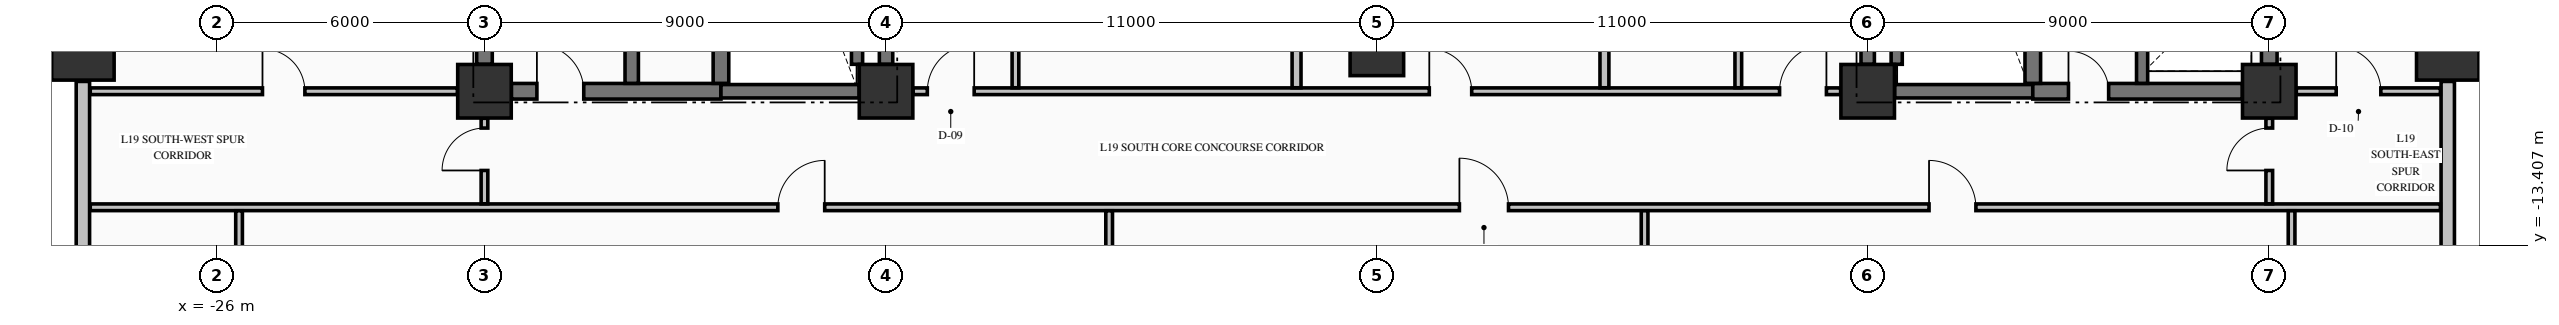
"""IFC4 building model, lengths in metres.
Left out: names, types, materials, properties, quantities, classifications, styles, units other than length and angle.
Written with IfcOpenShell. Run it as: python <this file> out.ifc"""

import sys

from ifc_helpers import new_model, si_unit, direction, frame, frame_2d, origin, origin_2d, place, context, subcontext, project, spatial, rectangle, extrude, element, fill, save


model = new_model("IFC4")
c1 = context("Model", 3, precision=1e-05, world=origin(), true_north=direction((0.0, 1.0)))
c2 = subcontext(c1, "Body", "Model", "MODEL_VIEW")
j1 = project(units=[si_unit("LENGTHUNIT", "METRE"), si_unit("PLANEANGLEUNIT", "RADIAN")], contexts=[c1])
p1 = place(None, origin())
s1 = spatial("IfcSite", under=j1, at=p1, CompositionType="ELEMENT")
p2 = place(p1, origin())
s2 = spatial("IfcBuilding", under=s1, at=p2, CompositionType="ELEMENT")
p3 = place(p2, frame((0.0, 0.0, 78.61)))
s3 = spatial("IfcBuildingStorey", under=s2, at=p3, CompositionType="ELEMENT", Elevation=78.61)
for number, where, z_axis, x_axis in (
    (1, (-29.0, -9.0, -0.25), (0.0, 0.0, 1.0), (1.0, 0.0, 0.0)),
    (2, (24.0, -9.0, -0.25), (0.0, 0.0, 1.0), (1.0, 0.0, 0.0)),
):
    element("IfcColumn", number, at=place(p3, frame(where, z_axis=z_axis, x_axis=x_axis)), inside=s3, PredefinedType="COLUMN", context=c2, shape_type="SweptSolid", body=[
        extrude(rectangle(XDim=1.4, YDim=1.4, at=origin_2d()), origin(), (0.0, 0.0, 1.0), 3.395),
    ])
for number, where, z_axis, x_axis in (
    (3, (-20.0, -9.95, -0.25), (0.0, 0.0, 1.0), (1.0, 0.0, 0.0)),
    (4, (-11.0, -9.95, -0.25), (0.0, 0.0, 1.0), (1.0, 0.0, 0.0)),
    (5, (11.0, -9.95, -0.25), (0.0, 0.0, 1.0), (1.0, 0.0, 0.0)),
    (6, (20.0, -9.95, -0.25), (0.0, 0.0, 1.0), (1.0, 0.0, 0.0)),
    (7, (0.0, -9.0, -0.25), (0.0, 0.0, 1.0), (1.0, 0.0, 0.0)),
):
    element("IfcColumn", number, at=place(p3, frame(where, z_axis=z_axis, x_axis=x_axis)), inside=s3, PredefinedType="COLUMN", context=c2, shape_type="SweptSolid", body=[
        extrude(rectangle(XDim=1.2, YDim=1.2, at=origin_2d()), origin(), (0.0, 0.0, 1.0), 3.395),
    ])
for number, where, z_axis, x_axis in (
    (8, (24.0, -22.27, 0.0), (0.0, 0.0, 1.0), (0.0, 1.0, 0.0)),
    (9, (-29.0, -9.73, 0.0), (0.0, 0.0, 1.0), (0.0, -1.0, 0.0)),
):
    element("IfcWall", number, at=place(p3, frame(where, z_axis=z_axis, x_axis=x_axis)), inside=s3, PredefinedType="STANDARD", context=c2, shape_type="SweptSolid", body=[
        extrude(rectangle(XDim=12.54, YDim=0.3, at=frame_2d((6.27, 0.0))), origin(), (0.0, 0.0, 1.0), 2.537),
    ])
p4 = place(p3, frame((-19.396, -9.95, 0.0), z_axis=(0.0, 0.0, 1.0), x_axis=(1.0, 0.0, 0.0)))
e10 = element("IfcWall", 10, at=p4, inside=s3, PredefinedType="SHEAR", context=c2, shape_type="SweptSolid", body=[
    extrude(rectangle(XDim=4.696, YDim=0.35, at=frame_2d((2.348, 0.0))), origin(), (0.0, 0.0, 1.0), 3.145),
])
p5 = place(p4, frame((0.571, 0.0, 0.0)))
e11 = element("IfcOpeningElement", 11, at=p5, cuts=e10, PredefinedType="OPENING", context=c2, shape_type="SweptSolid", body=[
    extrude(rectangle(XDim=1.05, YDim=2.15, at=frame_2d((0.525, 1.075))), frame((0.0, 0.185, 0.0), z_axis=(0.0, -1.0, 0.0), x_axis=(1.0, 0.0, 0.0)), (0.0, 0.0, 1.0), 0.37),
])
for number, where, z_axis, x_axis in (
    (12, (-14.7, -9.95, 0.0), (0.0, 0.0, 1.0), (1.0, 0.0, 0.0)),
    (13, (11.604, -9.95, 0.0), (0.0, 0.0, 1.0), (1.0, 0.0, 0.0)),
):
    element("IfcWall", number, at=place(p3, frame(where, z_axis=z_axis, x_axis=x_axis)), inside=s3, PredefinedType="SHEAR", context=c2, shape_type="SweptSolid", body=[
        extrude(rectangle(XDim=3.096, YDim=0.3, at=frame_2d((1.548, 0.0))), origin(), (0.0, 0.0, 1.0), 3.145),
    ])
p6 = place(p3, frame((14.7, -9.95, 0.0), z_axis=(0.0, 0.0, 1.0), x_axis=(1.0, 0.0, 0.0)))
e14 = element("IfcWall", 14, at=p6, inside=s3, PredefinedType="SHEAR", context=c2, shape_type="SweptSolid", body=[
    extrude(rectangle(XDim=4.696, YDim=0.35, at=frame_2d((2.348, 0.0))), origin(), (0.0, 0.0, 1.0), 3.145),
])
p7 = place(p6, frame((0.8, 0.0, 0.0)))
e15 = element("IfcOpeningElement", 15, at=p7, cuts=e14, PredefinedType="OPENING", context=c2, shape_type="SweptSolid", body=[
    extrude(rectangle(XDim=0.9, YDim=2.15, at=frame_2d((0.45, 1.075))), frame((0.0, 0.185, 0.0), z_axis=(0.0, -1.0, 0.0), x_axis=(1.0, 0.0, 0.0)), (0.0, 0.0, 1.0), 0.37),
])
p8 = place(p3, frame((-28.835, -12.55, 0.0), z_axis=(0.0, 0.0, 1.0), x_axis=(1.0, 0.0, 0.0)))
e16 = element("IfcWall", 16, at=p8, inside=s3, PredefinedType="PARTITIONING", context=c2, shape_type="SweptSolid", body=[
    extrude(rectangle(XDim=52.67, YDim=0.15, at=frame_2d((26.335, 0.0))), origin(), (0.0, 0.0, 1.0), 3.145),
])
p9 = place(p8, frame((30.685, 0.0, 0.0)))
e17 = element("IfcOpeningElement", 17, at=p9, cuts=e16, PredefinedType="OPENING", context=c2, shape_type="SweptSolid", body=[
    extrude(rectangle(XDim=1.1, YDim=2.15, at=frame_2d((0.55, 1.075))), frame((0.0, 0.085, 0.0), z_axis=(0.0, -1.0, 0.0), x_axis=(1.0, 0.0, 0.0)), (0.0, 0.0, 1.0), 0.17),
])
p10 = place(p8, frame((15.41, 0.0, 0.0)))
e18 = element("IfcOpeningElement", 18, at=p10, cuts=e16, PredefinedType="OPENING", context=c2, shape_type="SweptSolid", body=[
    extrude(rectangle(XDim=1.05, YDim=2.15, at=frame_2d((0.525, 1.075))), frame((0.0, 0.085, 0.0), z_axis=(0.0, -1.0, 0.0), x_axis=(1.0, 0.0, 0.0)), (0.0, 0.0, 1.0), 0.17),
])
p11 = place(p8, frame((41.21, 0.0, 0.0)))
e19 = element("IfcOpeningElement", 19, at=p11, cuts=e16, PredefinedType="OPENING", context=c2, shape_type="SweptSolid", body=[
    extrude(rectangle(XDim=1.05, YDim=2.15, at=frame_2d((0.525, 1.075))), frame((0.0, 0.085, 0.0), z_axis=(0.0, -1.0, 0.0), x_axis=(1.0, 0.0, 0.0)), (0.0, 0.0, 1.0), 0.17),
])
p12 = place(p3, frame((-28.835, -9.95, 0.0), z_axis=(0.0, 0.0, 1.0), x_axis=(1.0, 0.0, 0.0)))
e20 = element("IfcWall", 20, at=p12, inside=s3, PredefinedType="PARTITIONING", context=c2, shape_type="SweptSolid", body=[
    extrude(rectangle(XDim=8.229, YDim=0.15, at=frame_2d((4.115, 0.0))), origin(), (0.0, 0.0, 1.0), 3.145),
])
p13 = place(p12, frame((3.86, 0.0, 0.0)))
e21 = element("IfcOpeningElement", 21, at=p13, cuts=e20, PredefinedType="OPENING", context=c2, shape_type="SweptSolid", body=[
    extrude(rectangle(XDim=0.95, YDim=2.15, at=frame_2d((0.475, 1.075))), frame((0.0, 0.085, 0.0), z_axis=(0.0, -1.0, 0.0), x_axis=(1.0, 0.0, 0.0)), (0.0, 0.0, 1.0), 0.17),
])
p14 = place(p3, frame((-10.394, -9.95, 0.0), z_axis=(0.0, 0.0, 1.0), x_axis=(1.0, 0.0, 0.0)))
e22 = element("IfcWall", 22, at=p14, inside=s3, PredefinedType="PARTITIONING", context=c2, shape_type="SweptSolid", body=[
    extrude(rectangle(XDim=20.788, YDim=0.15, at=frame_2d((10.394, 0.0))), origin(), (0.0, 0.0, 1.0), 3.145),
])
p15 = place(p14, frame((0.319, 0.0, 0.0)))
e23 = element("IfcOpeningElement", 23, at=p15, cuts=e22, PredefinedType="OPENING", context=c2, shape_type="SweptSolid", body=[
    extrude(rectangle(XDim=1.05, YDim=2.15, at=frame_2d((0.525, 1.075))), frame((0.0, 0.085, 0.0), z_axis=(0.0, -1.0, 0.0), x_axis=(1.0, 0.0, 0.0)), (0.0, 0.0, 1.0), 0.17),
])
p16 = place(p14, frame((19.419, 0.0, 0.0)))
e24 = element("IfcOpeningElement", 24, at=p16, cuts=e22, PredefinedType="OPENING", context=c2, shape_type="SweptSolid", body=[
    extrude(rectangle(XDim=1.05, YDim=2.15, at=frame_2d((0.525, 1.075))), frame((0.0, 0.085, 0.0), z_axis=(0.0, -1.0, 0.0), x_axis=(1.0, 0.0, 0.0)), (0.0, 0.0, 1.0), 0.17),
])
p17 = place(p14, frame((11.569, 0.0, 0.0)))
e25 = element("IfcOpeningElement", 25, at=p17, cuts=e22, PredefinedType="OPENING", context=c2, shape_type="SweptSolid", body=[
    extrude(rectangle(XDim=0.95, YDim=2.15, at=frame_2d((0.475, 1.075))), frame((0.0, 0.085, 0.0), z_axis=(0.0, -1.0, 0.0), x_axis=(1.0, 0.0, 0.0)), (0.0, 0.0, 1.0), 0.17),
])
p18 = place(p3, frame((20.606, -9.95, 0.0), z_axis=(0.0, 0.0, 1.0), x_axis=(1.0, 0.0, 0.0)))
e26 = element("IfcWall", 26, at=p18, inside=s3, PredefinedType="PARTITIONING", context=c2, shape_type="SweptSolid", body=[
    extrude(rectangle(XDim=3.229, YDim=0.15, at=frame_2d((1.615, 0.0))), origin(), (0.0, 0.0, 1.0), 3.145),
])
p19 = place(p18, frame((0.894, 0.0, 0.0)))
e27 = element("IfcOpeningElement", 27, at=p19, cuts=e26, PredefinedType="OPENING", context=c2, shape_type="SweptSolid", body=[
    extrude(rectangle(XDim=1.0, YDim=2.15, at=frame_2d((0.5, 1.075))), frame((0.0, 0.085, 0.0), z_axis=(0.0, -1.0, 0.0), x_axis=(1.0, 0.0, 0.0)), (0.0, 0.0, 1.0), 0.17),
])
p20 = place(p3, frame((-20.0, -9.346, 0.0), z_axis=(0.0, 0.0, 1.0), x_axis=(0.0, 1.0, 0.0)))
e28 = element("IfcWall", 28, at=p20, inside=s3, PredefinedType="SHEAR", context=c2, shape_type="SweptSolid", body=[
    extrude(rectangle(XDim=8.742, YDim=0.35, at=frame_2d((4.371, 0.0))), origin(), (0.0, 0.0, 1.0), 3.145),
])
p21 = place(p3, frame((-16.7, -9.773, 0.0), z_axis=(0.0, 0.0, 1.0), x_axis=(0.0, 1.0, 0.0)))
e29 = element("IfcWall", 29, at=p21, inside=s3, PredefinedType="SHEAR", context=c2, shape_type="SweptSolid", body=[
    extrude(rectangle(XDim=9.371, YDim=0.3, at=frame_2d((4.686, 0.0))), origin(), (0.0, 0.0, 1.0), 3.145),
])
p22 = place(p3, frame((-14.7, -9.773, 0.0), z_axis=(0.0, 0.0, 1.0), x_axis=(0.0, 1.0, 0.0)))
e30 = element("IfcWall", 30, at=p22, inside=s3, PredefinedType="SHEAR", context=c2, shape_type="SweptSolid", body=[
    extrude(rectangle(XDim=9.371, YDim=0.35, at=frame_2d((4.686, 0.0))), origin(), (0.0, 0.0, 1.0), 3.145),
])
p23 = place(p3, frame((-11.65, -9.346, 0.0), z_axis=(0.0, 0.0, 1.0), x_axis=(0.0, 1.0, 0.0)))
e31 = element("IfcWall", 31, at=p23, inside=s3, PredefinedType="SOLIDWALL", context=c2, shape_type="SweptSolid", body=[
    extrude(rectangle(XDim=8.742, YDim=0.25, at=frame_2d((4.371, 0.0))), origin(), (0.0, 0.0, 1.0), 3.145),
])
for number, where, z_axis, x_axis in (
    (32, (-11.0, -9.346, 0.0), (0.0, 0.0, 1.0), (0.0, 1.0, 0.0)),
    (33, (11.0, -9.346, 0.0), (0.0, 0.0, 1.0), (0.0, 1.0, 0.0)),
):
    element("IfcWall", number, at=place(p3, frame(where, z_axis=z_axis, x_axis=x_axis)), inside=s3, PredefinedType="SHEAR", context=c2, shape_type="SweptSolid", body=[
        extrude(rectangle(XDim=8.742, YDim=0.3, at=frame_2d((4.371, 0.0))), origin(), (0.0, 0.0, 1.0), 3.145),
    ])
p24 = place(p3, frame((11.65, -9.346, 0.0), z_axis=(0.0, 0.0, 1.0), x_axis=(0.0, 1.0, 0.0)))
e34 = element("IfcWall", 34, at=p24, inside=s3, PredefinedType="SOLIDWALL", context=c2, shape_type="SweptSolid", body=[
    extrude(rectangle(XDim=8.742, YDim=0.25, at=frame_2d((4.371, 0.0))), origin(), (0.0, 0.0, 1.0), 3.145),
])
p25 = place(p3, frame((14.7, -9.773, 0.0), z_axis=(0.0, 0.0, 1.0), x_axis=(0.0, 1.0, 0.0)))
e35 = element("IfcWall", 35, at=p25, inside=s3, PredefinedType="SHEAR", context=c2, shape_type="SweptSolid", body=[
    extrude(rectangle(XDim=9.371, YDim=0.35, at=frame_2d((4.686, 0.0))), origin(), (0.0, 0.0, 1.0), 3.145),
])
p26 = place(p3, frame((17.15, -9.773, 0.0), z_axis=(0.0, 0.0, 1.0), x_axis=(0.0, 1.0, 0.0)))
e36 = element("IfcWall", 36, at=p26, inside=s3, PredefinedType="SOLIDWALL", context=c2, shape_type="SweptSolid", body=[
    extrude(rectangle(XDim=2.596, YDim=0.25, at=frame_2d((1.298, 0.0))), origin(), (0.0, 0.0, 1.0), 3.145),
])
p27 = place(p3, frame((20.0, -9.346, 0.0), z_axis=(0.0, 0.0, 1.0), x_axis=(0.0, 1.0, 0.0)))
e37 = element("IfcWall", 37, at=p27, inside=s3, PredefinedType="SHEAR", context=c2, shape_type="SweptSolid", body=[
    extrude(rectangle(XDim=2.169, YDim=0.35, at=frame_2d((1.084, 0.0))), origin(), (0.0, 0.0, 1.0), 3.145),
])
p28 = place(p3, frame((-25.5, -22.294, 0.0), z_axis=(0.0, 0.0, 1.0), x_axis=(0.0, 1.0, 0.0)))
e38 = element("IfcWall", 38, at=p28, inside=s3, PredefinedType="PARTITIONING", context=c2, shape_type="SweptSolid", body=[
    extrude(rectangle(XDim=9.666, YDim=0.15, at=frame_2d((4.833, 0.0))), origin(), (0.0, 0.0, 1.0), 3.145),
])
p29 = place(p3, frame((-20.0, -12.472, 0.0), z_axis=(0.0, 0.0, 1.0), x_axis=(0.0, 1.0, 0.0)))
e39 = element("IfcWall", 39, at=p29, inside=s3, PredefinedType="PARTITIONING", context=c2, shape_type="SweptSolid", body=[
    extrude(rectangle(XDim=1.916, YDim=0.15, at=frame_2d((0.958, 0.0))), origin(), (0.0, 0.0, 1.0), 2.485),
])
p30 = place(p29, frame((0.747, 0.0, 0.0)))
e40 = element("IfcOpeningElement", 40, at=p30, cuts=e39, PredefinedType="OPENING", context=c2, shape_type="SweptSolid", body=[
    extrude(rectangle(XDim=0.95, YDim=2.15, at=frame_2d((0.475, 1.075))), frame((0.0, 0.085, 0.0), z_axis=(0.0, -1.0, 0.0), x_axis=(1.0, 0.0, 0.0)), (0.0, 0.0, 1.0), 0.17),
])
p31 = place(p3, frame((-8.1, -9.872, 0.0), z_axis=(0.0, 0.0, 1.0), x_axis=(0.0, 1.0, 0.0)))
e41 = element("IfcWall", 41, at=p31, inside=s3, PredefinedType="PARTITIONING", context=c2, shape_type="SweptSolid", body=[
    extrude(rectangle(XDim=6.569, YDim=0.15, at=frame_2d((3.285, 0.0))), origin(), (0.0, 0.0, 1.0), 3.145),
])
p32 = place(p31, frame((2.827, 0.0, 0.0)))
e42 = element("IfcOpeningElement", 42, at=p32, cuts=e41, PredefinedType="OPENING", context=c2, shape_type="SweptSolid", body=[
    extrude(rectangle(XDim=0.95, YDim=2.15, at=frame_2d((0.475, 1.075))), frame((0.0, 0.085, 0.0), z_axis=(0.0, -1.0, 0.0), x_axis=(1.0, 0.0, 0.0)), (0.0, 0.0, 1.0), 0.17),
])
p33 = place(p3, frame((-6.0, -18.472, 0.0), z_axis=(0.0, 0.0, 1.0), x_axis=(0.0, 1.0, 0.0)))
e43 = element("IfcWall", 43, at=p33, inside=s3, PredefinedType="PARTITIONING", context=c2, shape_type="SweptSolid", body=[
    extrude(rectangle(XDim=5.844, YDim=0.15, at=frame_2d((2.922, 0.0))), origin(), (0.0, 0.0, 1.0), 3.145),
])
for number, where, z_axis, x_axis in (
    (44, (-1.8, -9.872, 0.0), (0.0, 0.0, 1.0), (0.0, 1.0, 0.0)),
    (45, (5.1, -9.872, 0.0), (0.0, 0.0, 1.0), (0.0, 1.0, 0.0)),
):
    element("IfcWall", number, at=place(p3, frame(where, z_axis=z_axis, x_axis=x_axis)), inside=s3, PredefinedType="PARTITIONING", context=c2, shape_type="SweptSolid", body=[
        extrude(rectangle(XDim=4.969, YDim=0.2, at=frame_2d((2.484, 0.0))), origin(), (0.0, 0.0, 1.0), 3.145),
    ])
p34 = place(p3, frame((6.0, -18.472, 0.0), z_axis=(0.0, 0.0, 1.0), x_axis=(0.0, 1.0, 0.0)))
e46 = element("IfcWall", 46, at=p34, inside=s3, PredefinedType="PARTITIONING", context=c2, shape_type="SweptSolid", body=[
    extrude(rectangle(XDim=5.844, YDim=0.15, at=frame_2d((2.922, 0.0))), origin(), (0.0, 0.0, 1.0), 3.145),
])
p35 = place(p3, frame((8.1, -9.872, 0.0), z_axis=(0.0, 0.0, 1.0), x_axis=(0.0, 1.0, 0.0)))
e47 = element("IfcWall", 47, at=p35, inside=s3, PredefinedType="PARTITIONING", context=c2, shape_type="SweptSolid", body=[
    extrude(rectangle(XDim=4.969, YDim=0.15, at=frame_2d((2.484, 0.0))), origin(), (0.0, 0.0, 1.0), 3.145),
])
p36 = place(p35, frame((1.997, 0.0, 0.0)))
e48 = element("IfcOpeningElement", 48, at=p36, cuts=e47, PredefinedType="OPENING", context=c2, shape_type="SweptSolid", body=[
    extrude(rectangle(XDim=0.95, YDim=2.15, at=frame_2d((0.475, 1.075))), frame((0.0, 0.085, 0.0), z_axis=(0.0, -1.0, 0.0), x_axis=(1.0, 0.0, 0.0)), (0.0, 0.0, 1.0), 0.17),
])
p37 = place(p3, frame((20.0, -12.472, 0.0), z_axis=(0.0, 0.0, 1.0), x_axis=(0.0, 1.0, 0.0)))
e49 = element("IfcWall", 49, at=p37, inside=s3, PredefinedType="PARTITIONING", context=c2, shape_type="SweptSolid", body=[
    extrude(rectangle(XDim=1.916, YDim=0.15, at=frame_2d((0.958, 0.0))), origin(), (0.0, 0.0, 1.0), 3.145),
])
p38 = place(p37, frame((0.747, 0.0, 0.0)))
e50 = element("IfcOpeningElement", 50, at=p38, cuts=e49, PredefinedType="OPENING", context=c2, shape_type="SweptSolid", body=[
    extrude(rectangle(XDim=0.95, YDim=2.15, at=frame_2d((0.475, 1.075))), frame((0.0, 0.085, 0.0), z_axis=(0.0, -1.0, 0.0), x_axis=(1.0, 0.0, 0.0)), (0.0, 0.0, 1.0), 0.17),
])
p39 = place(p3, frame((20.5, -22.294, 0.0), z_axis=(0.0, 0.0, 1.0), x_axis=(0.0, 1.0, 0.0)))
e51 = element("IfcWall", 51, at=p39, inside=s3, PredefinedType="PARTITIONING", context=c2, shape_type="SweptSolid", body=[
    extrude(rectangle(XDim=9.666, YDim=0.15, at=frame_2d((4.833, 0.0))), origin(), (0.0, 0.0, 1.0), 3.145),
])
p40 = place(p5, origin())
e52 = element("IfcDoor", 52, at=p40, inside=s3, OperationType="SINGLE_SWING_LEFT", PredefinedType="DOOR", context=c2, shape_type="SweptSolid", body=[
    extrude(rectangle(XDim=1.05, YDim=2.15, at=frame_2d((0.525, 1.075))), frame((0.0, 0.025, 0.0), z_axis=(0.0, -1.0, 0.0), x_axis=(1.0, 0.0, 0.0)), (0.0, 0.0, 1.0), 0.05),
])
fill(e11, e52)
p41 = place(p7, origin())
e53 = element("IfcDoor", 53, at=p41, inside=s3, OperationType="SINGLE_SWING_LEFT", PredefinedType="DOOR", context=c2, shape_type="SweptSolid", body=[
    extrude(rectangle(XDim=0.9, YDim=2.15, at=frame_2d((0.45, 1.075))), frame((0.0, 0.025, 0.0), z_axis=(0.0, -1.0, 0.0), x_axis=(1.0, 0.0, 0.0)), (0.0, 0.0, 1.0), 0.05),
])
fill(e15, e53)
p42 = place(p15, origin())
e54 = element("IfcDoor", 54, at=p42, inside=s3, OperationType="SINGLE_SWING_RIGHT", PredefinedType="DOOR", context=c2, shape_type="SweptSolid", body=[
    extrude(rectangle(XDim=1.05, YDim=2.15, at=frame_2d((0.525, 1.075))), frame((0.0, 0.025, 0.0), z_axis=(0.0, -1.0, 0.0), x_axis=(1.0, 0.0, 0.0)), (0.0, 0.0, 1.0), 0.05),
])
fill(e23, e54)
p43 = place(p16, origin())
e55 = element("IfcDoor", 55, at=p43, inside=s3, OperationType="SINGLE_SWING_RIGHT", PredefinedType="DOOR", context=c2, shape_type="SweptSolid", body=[
    extrude(rectangle(XDim=1.05, YDim=2.15, at=frame_2d((0.525, 1.075))), frame((0.0, 0.025, 0.0), z_axis=(0.0, -1.0, 0.0), x_axis=(1.0, 0.0, 0.0)), (0.0, 0.0, 1.0), 0.05),
])
fill(e24, e55)
p44 = place(p9, origin())
e56 = element("IfcDoor", 56, at=p44, inside=s3, OperationType="SINGLE_SWING_LEFT", PredefinedType="DOOR", context=c2, shape_type="SweptSolid", body=[
    extrude(rectangle(XDim=1.1, YDim=2.15, at=frame_2d((0.55, 1.075))), frame((0.0, 0.025, 0.0), z_axis=(0.0, -1.0, 0.0), x_axis=(1.0, 0.0, 0.0)), (0.0, 0.0, 1.0), 0.05),
])
fill(e17, e56)
p45 = place(p10, origin())
e57 = element("IfcDoor", 57, at=p45, inside=s3, OperationType="SINGLE_SWING_RIGHT", PredefinedType="DOOR", context=c2, shape_type="SweptSolid", body=[
    extrude(rectangle(XDim=1.05, YDim=2.15, at=frame_2d((0.525, 1.075))), frame((0.0, 0.025, 0.0), z_axis=(0.0, -1.0, 0.0), x_axis=(1.0, 0.0, 0.0)), (0.0, 0.0, 1.0), 0.05),
])
fill(e18, e57)
p46 = place(p11, origin())
e58 = element("IfcDoor", 58, at=p46, inside=s3, OperationType="SINGLE_SWING_LEFT", PredefinedType="DOOR", context=c2, shape_type="SweptSolid", body=[
    extrude(rectangle(XDim=1.05, YDim=2.15, at=frame_2d((0.525, 1.075))), frame((0.0, 0.025, 0.0), z_axis=(0.0, -1.0, 0.0), x_axis=(1.0, 0.0, 0.0)), (0.0, 0.0, 1.0), 0.05),
])
fill(e19, e58)
p47 = place(p17, origin())
e59 = element("IfcDoor", 59, at=p47, inside=s3, OperationType="SINGLE_SWING_LEFT", PredefinedType="DOOR", context=c2, shape_type="SweptSolid", body=[
    extrude(rectangle(XDim=0.95, YDim=2.15, at=frame_2d((0.475, 1.075))), frame((0.0, 0.025, 0.0), z_axis=(0.0, -1.0, 0.0), x_axis=(1.0, 0.0, 0.0)), (0.0, 0.0, 1.0), 0.05),
])
fill(e25, e59)
p48 = place(p30, origin())
e60 = element("IfcDoor", 60, at=p48, inside=s3, OperationType="SINGLE_SWING_LEFT", PredefinedType="DOOR", context=c2, shape_type="SweptSolid", body=[
    extrude(rectangle(XDim=0.95, YDim=2.15, at=frame_2d((0.475, 1.075))), frame((0.0, 0.025, 0.0), z_axis=(0.0, -1.0, 0.0), x_axis=(1.0, 0.0, 0.0)), (0.0, 0.0, 1.0), 0.05),
])
fill(e40, e60)
p49 = place(p13, origin())
e61 = element("IfcDoor", 61, at=p49, inside=s3, OperationType="SINGLE_SWING_LEFT", PredefinedType="DOOR", context=c2, shape_type="SweptSolid", body=[
    extrude(rectangle(XDim=0.95, YDim=2.15, at=frame_2d((0.475, 1.075))), frame((0.0, 0.025, 0.0), z_axis=(0.0, -1.0, 0.0), x_axis=(1.0, 0.0, 0.0)), (0.0, 0.0, 1.0), 0.05),
])
fill(e21, e61)
p50 = place(p38, origin())
e62 = element("IfcDoor", 62, at=p50, inside=s3, OperationType="SINGLE_SWING_LEFT", PredefinedType="DOOR", context=c2, shape_type="SweptSolid", body=[
    extrude(rectangle(XDim=0.95, YDim=2.15, at=frame_2d((0.475, 1.075))), frame((0.0, 0.025, 0.0), z_axis=(0.0, -1.0, 0.0), x_axis=(1.0, 0.0, 0.0)), (0.0, 0.0, 1.0), 0.05),
])
fill(e50, e62)
p51 = place(p19, origin())
e63 = element("IfcDoor", 63, at=p51, inside=s3, OperationType="SINGLE_SWING_LEFT", PredefinedType="DOOR", context=c2, shape_type="SweptSolid", body=[
    extrude(rectangle(XDim=1.0, YDim=2.15, at=frame_2d((0.5, 1.075))), frame((0.0, 0.025, 0.0), z_axis=(0.0, -1.0, 0.0), x_axis=(1.0, 0.0, 0.0)), (0.0, 0.0, 1.0), 0.05),
])
fill(e27, e63)
save(model, sys.argv[1])
